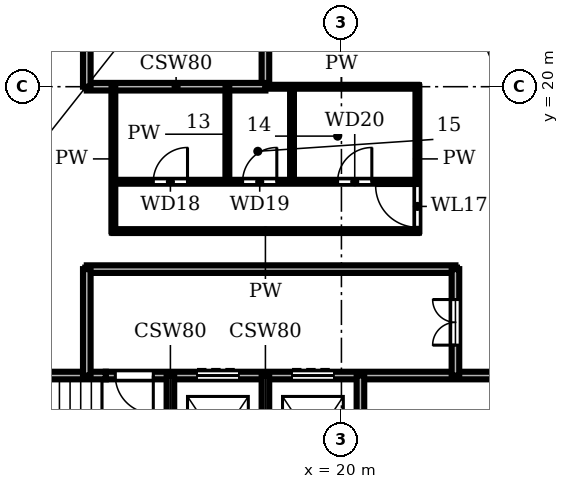
"""IFC4 building model, lengths in metres.
Left out: names, types, materials, properties, quantities, classifications, styles, units other than length and angle.
Written with IfcOpenShell. Run it as: python <this file> out.ifc"""

import sys

from ifc_helpers import new_model, si_unit, direction, frame, frame_2d, origin, place, context, subcontext, project, spatial, rectangle, extrude, element, fill, save


model = new_model("IFC4")
c1 = context("Model", 3, precision=1e-05, world=origin(), true_north=direction((0.0, 1.0)))
c2 = subcontext(c1, "Body", "Model", "MODEL_VIEW")
j1 = project(units=[si_unit("LENGTHUNIT", "METRE"), si_unit("PLANEANGLEUNIT", "RADIAN")], contexts=[c1])
p1 = place(None, origin())
s1 = spatial("IfcSite", under=j1, at=p1, CompositionType="ELEMENT")
p2 = place(p1, origin())
s2 = spatial("IfcBuilding", under=s1, at=p2, CompositionType="ELEMENT")
p3 = place(p2, frame((0.0, 0.0, 113.4)))
s3 = spatial("IfcBuildingStorey", under=s2, at=p3, CompositionType="ELEMENT", Elevation=113.4)
p4 = place(p3, frame((8.9, 12.4, 0.0), z_axis=(0.0, 0.0, 1.0), x_axis=(1.0, 0.0, 0.0)))
e1 = element("IfcWall", 1, at=p4, inside=s3, PredefinedType="SHEAR", context=c2, shape_type="SweptSolid", body=[
    extrude(rectangle(XDim=4.9, YDim=0.2, at=frame_2d((2.45, 0.0))), origin(), (0.0, 0.0, 1.0), 3.45),
])
p5 = place(p3, frame((13.8, 12.4, 0.0), z_axis=(0.0, 0.0, 1.0), x_axis=(1.0, 0.0, 0.0)))
e2 = element("IfcWall", 2, at=p5, inside=s3, PredefinedType="SHEAR", context=c2, shape_type="SweptSolid", body=[
    extrude(rectangle(XDim=13.3, YDim=0.2, at=frame_2d((6.65, 0.0))), origin(), (0.0, 0.0, 1.0), 3.45),
])
p6 = place(p5, frame((2.4, 0.0, 0.0)))
e3 = element("IfcOpeningElement", 3, at=p6, cuts=e2, PredefinedType="OPENING", context=c2, shape_type="SweptSolid", body=[
    extrude(rectangle(XDim=1.1, YDim=2.1, at=frame_2d((0.55, 1.05))), frame((0.0, 0.11, 0.0), z_axis=(0.0, -1.0, 0.0), x_axis=(1.0, 0.0, 0.0)), (0.0, 0.0, 1.0), 0.22),
])
p7 = place(p5, frame((4.9, 0.0, 0.0)))
e4 = element("IfcOpeningElement", 4, at=p7, cuts=e2, PredefinedType="OPENING", context=c2, shape_type="SweptSolid", body=[
    extrude(rectangle(XDim=1.1, YDim=2.1, at=frame_2d((0.55, 1.05))), frame((0.0, 0.11, 0.0), z_axis=(0.0, -1.0, 0.0), x_axis=(1.0, 0.0, 0.0)), (0.0, 0.0, 1.0), 0.22),
])
p8 = place(p5, frame((0.25, 0.0, 0.0)))
e5 = element("IfcOpeningElement", 5, at=p8, cuts=e2, PredefinedType="OPENING", context=c2, shape_type="SweptSolid", body=[
    extrude(rectangle(XDim=1.0, YDim=2.1, at=frame_2d((0.5, 1.05))), frame((0.0, 0.11, 0.0), z_axis=(0.0, -1.0, 0.0), x_axis=(1.0, 0.0, 0.0)), (0.0, 0.0, 1.0), 0.22),
])
p9 = place(p3, frame((13.3, 15.2, 0.0), z_axis=(0.0, 0.0, 1.0), x_axis=(1.0, 0.0, 0.0)))
e6 = element("IfcWall", 6, at=p9, inside=s3, PredefinedType="SHEAR", context=c2, shape_type="SweptSolid", body=[
    extrude(rectangle(XDim=9.7, YDim=0.2, at=frame_2d((4.85, 0.0))), origin(), (0.0, 0.0, 1.0), 3.45),
])
p10 = place(p3, frame((14.0, 16.2, 0.0), z_axis=(0.0, 0.0, 1.0), x_axis=(1.0, 0.0, 0.0)))
e7 = element("IfcWall", 7, at=p10, inside=s3, PredefinedType="PARTITIONING", context=c2, shape_type="SweptSolid", body=[
    extrude(rectangle(XDim=8.0, YDim=0.1, at=frame_2d((4.0, 0.0))), origin(), (0.0, 0.0, 1.0), 3.45),
])
p11 = place(p3, frame((14.0, 17.5, 0.0), z_axis=(0.0, 0.0, 1.0), x_axis=(1.0, 0.0, 0.0)))
e8 = element("IfcWall", 8, at=p11, inside=s3, PredefinedType="PARTITIONING", context=c2, shape_type="SweptSolid", body=[
    extrude(rectangle(XDim=8.0, YDim=0.1, at=frame_2d((4.0, 0.0))), origin(), (0.0, 0.0, 1.0), 3.45),
])
p12 = place(p11, frame((1.05, 0.0, 0.0)))
e9 = element("IfcOpeningElement", 9, at=p12, cuts=e8, PredefinedType="OPENING", context=c2, shape_type="SweptSolid", body=[
    extrude(rectangle(XDim=0.9, YDim=2.1, at=frame_2d((0.45, 1.05))), frame((0.0, 0.06, 0.0), z_axis=(0.0, -1.0, 0.0), x_axis=(1.0, 0.0, 0.0)), (0.0, 0.0, 1.0), 0.12),
])
p13 = place(p11, frame((3.4, 0.0, 0.0)))
e10 = element("IfcOpeningElement", 10, at=p13, cuts=e8, PredefinedType="OPENING", context=c2, shape_type="SweptSolid", body=[
    extrude(rectangle(XDim=0.9, YDim=2.1, at=frame_2d((0.45, 1.05))), frame((0.0, 0.06, 0.0), z_axis=(0.0, -1.0, 0.0), x_axis=(1.0, 0.0, 0.0)), (0.0, 0.0, 1.0), 0.12),
])
p14 = place(p11, frame((5.9, 0.0, 0.0)))
e11 = element("IfcOpeningElement", 11, at=p14, cuts=e8, PredefinedType="OPENING", context=c2, shape_type="SweptSolid", body=[
    extrude(rectangle(XDim=0.9, YDim=2.1, at=frame_2d((0.45, 1.05))), frame((0.0, 0.06, 0.0), z_axis=(0.0, -1.0, 0.0), x_axis=(1.0, 0.0, 0.0)), (0.0, 0.0, 1.0), 0.12),
])
p15 = place(p3, frame((18.0, 20.0, 0.0), z_axis=(0.0, 0.0, 1.0), x_axis=(1.0, 0.0, 0.0)))
e12 = element("IfcWall", 12, at=p15, inside=s3, PredefinedType="PARTITIONING", context=c2, shape_type="SweptSolid", body=[
    extrude(rectangle(XDim=4.0, YDim=0.1, at=frame_2d((2.0, 0.0))), origin(), (0.0, 0.0, 1.0), 3.45),
])
p16 = place(p3, frame((13.3, 20.0, 0.0), z_axis=(0.0, 0.0, 1.0), x_axis=(1.0, 0.0, 0.0)))
e13 = element("IfcWall", 13, at=p16, inside=s3, PredefinedType="SHEAR", context=c2, shape_type="SweptSolid", body=[
    extrude(rectangle(XDim=4.7, YDim=0.2, at=frame_2d((2.35, 0.0))), origin(), (0.0, 0.0, 1.0), 3.45),
])
p17 = place(p3, frame((13.3, 12.4, 0.0), z_axis=(0.0, 0.0, 1.0), x_axis=(0.0, 1.0, 0.0)))
e14 = element("IfcWall", 14, at=p17, inside=s3, PredefinedType="SHEAR", context=c2, shape_type="SweptSolid", body=[
    extrude(rectangle(XDim=2.8, YDim=0.2, at=frame_2d((1.4, 0.0))), origin(), (0.0, 0.0, 1.0), 3.45),
])
p18 = place(p3, frame((13.3, 20.0, 0.0), z_axis=(0.0, 0.0, 1.0), x_axis=(0.0, 1.0, 0.0)))
e15 = element("IfcWall", 15, at=p18, inside=s3, PredefinedType="SHEAR", context=c2, shape_type="SweptSolid", body=[
    extrude(rectangle(XDim=3.6, YDim=0.2, at=frame_2d((1.8, 0.0))), origin(), (0.0, 0.0, 1.0), 3.45),
])
p19 = place(p3, frame((14.0, 16.2, 0.0), z_axis=(0.0, 0.0, 1.0), x_axis=(0.0, 1.0, 0.0)))
e16 = element("IfcWall", 16, at=p19, inside=s3, PredefinedType="PARTITIONING", context=c2, shape_type="SweptSolid", body=[
    extrude(rectangle(XDim=3.8, YDim=0.1, at=frame_2d((1.9, 0.0))), origin(), (0.0, 0.0, 1.0), 3.45),
])
p20 = place(p3, frame((15.5, 8.9, 0.0), z_axis=(0.0, 0.0, 1.0), x_axis=(0.0, 1.0, 0.0)))
e17 = element("IfcWall", 17, at=p20, inside=s3, PredefinedType="SHEAR", context=c2, shape_type="SweptSolid", body=[
    extrude(rectangle(XDim=3.5, YDim=0.2, at=frame_2d((1.75, 0.0))), origin(), (0.0, 0.0, 1.0), 3.45),
])
p21 = place(p3, frame((17.0, 17.5, 0.0), z_axis=(0.0, 0.0, 1.0), x_axis=(0.0, 1.0, 0.0)))
e18 = element("IfcWall", 18, at=p21, inside=s3, PredefinedType="PARTITIONING", context=c2, shape_type="SweptSolid", body=[
    extrude(rectangle(XDim=2.5, YDim=0.1, at=frame_2d((1.25, 0.0))), origin(), (0.0, 0.0, 1.0), 3.45),
])
p22 = place(p3, frame((18.0, 8.9, 0.0), z_axis=(0.0, 0.0, 1.0), x_axis=(0.0, 1.0, 0.0)))
e19 = element("IfcWall", 19, at=p22, inside=s3, PredefinedType="SHEAR", context=c2, shape_type="SweptSolid", body=[
    extrude(rectangle(XDim=3.5, YDim=0.2, at=frame_2d((1.75, 0.0))), origin(), (0.0, 0.0, 1.0), 3.45),
])
p23 = place(p3, frame((18.0, 20.0, 0.0), z_axis=(0.0, 0.0, 1.0), x_axis=(0.0, 1.0, 0.0)))
e20 = element("IfcWall", 20, at=p23, inside=s3, PredefinedType="SHEAR", context=c2, shape_type="SweptSolid", body=[
    extrude(rectangle(XDim=7.1, YDim=0.2, at=frame_2d((3.55, 0.0))), origin(), (0.0, 0.0, 1.0), 3.45),
])
p24 = place(p23, frame((1.2, 0.0, 0.0)))
e21 = element("IfcOpeningElement", 21, at=p24, cuts=e20, PredefinedType="OPENING", context=c2, shape_type="SweptSolid", body=[
    extrude(rectangle(XDim=1.2, YDim=2.1, at=frame_2d((0.6, 1.05))), frame((0.0, 0.11, 0.0), z_axis=(0.0, -1.0, 0.0), x_axis=(1.0, 0.0, 0.0)), (0.0, 0.0, 1.0), 0.22),
])
p25 = place(p3, frame((18.7, 17.5, 0.0), z_axis=(0.0, 0.0, 1.0), x_axis=(0.0, 1.0, 0.0)))
e22 = element("IfcWall", 22, at=p25, inside=s3, PredefinedType="PARTITIONING", context=c2, shape_type="SweptSolid", body=[
    extrude(rectangle(XDim=2.5, YDim=0.1, at=frame_2d((1.25, 0.0))), origin(), (0.0, 0.0, 1.0), 3.45),
])
p26 = place(p3, frame((20.5, 8.9, 0.0), z_axis=(0.0, 0.0, 1.0), x_axis=(0.0, 1.0, 0.0)))
e23 = element("IfcWall", 23, at=p26, inside=s3, PredefinedType="SHEAR", context=c2, shape_type="SweptSolid", body=[
    extrude(rectangle(XDim=3.5, YDim=0.2, at=frame_2d((1.75, 0.0))), origin(), (0.0, 0.0, 1.0), 3.45),
])
p27 = place(p3, frame((22.0, 16.2, 0.0), z_axis=(0.0, 0.0, 1.0), x_axis=(0.0, 1.0, 0.0)))
e24 = element("IfcWall", 24, at=p27, inside=s3, PredefinedType="PARTITIONING", context=c2, shape_type="SweptSolid", body=[
    extrude(rectangle(XDim=3.8, YDim=0.1, at=frame_2d((1.9, 0.0))), origin(), (0.0, 0.0, 1.0), 3.45),
])
p28 = place(p27, frame((0.1, 0.0, 0.0)))
e25 = element("IfcOpeningElement", 25, at=p28, cuts=e24, PredefinedType="OPENING", context=c2, shape_type="SweptSolid", body=[
    extrude(rectangle(XDim=1.1, YDim=2.1, at=frame_2d((0.55, 1.05))), frame((0.0, 0.06, 0.0), z_axis=(0.0, -1.0, 0.0), x_axis=(1.0, 0.0, 0.0)), (0.0, 0.0, 1.0), 0.12),
])
p29 = place(p3, frame((23.0, 12.4, 0.0), z_axis=(0.0, 0.0, 1.0), x_axis=(0.0, 1.0, 0.0)))
e26 = element("IfcWall", 26, at=p29, inside=s3, PredefinedType="SHEAR", context=c2, shape_type="SweptSolid", body=[
    extrude(rectangle(XDim=2.8, YDim=0.2, at=frame_2d((1.4, 0.0))), origin(), (0.0, 0.0, 1.0), 3.45),
])
p30 = place(p29, frame((0.8, 0.0, 0.0)))
e27 = element("IfcOpeningElement", 27, at=p30, cuts=e26, PredefinedType="OPENING", context=c2, shape_type="SweptSolid", body=[
    extrude(rectangle(XDim=1.2, YDim=2.1, at=frame_2d((0.6, 1.05))), frame((0.0, 0.11, 0.0), z_axis=(0.0, -1.0, 0.0), x_axis=(1.0, 0.0, 0.0)), (0.0, 0.0, 1.0), 0.22),
])
p31 = place(p6, origin())
e28 = element("IfcDoor", 28, at=p31, inside=s3, OperationType="DOUBLE_DOOR_SLIDING", PredefinedType="DOOR", context=c2, shape_type="SweptSolid", body=[
    extrude(rectangle(XDim=1.1, YDim=2.1, at=frame_2d((0.55, 1.05))), frame((0.0, 0.025, 0.0), z_axis=(0.0, -1.0, 0.0), x_axis=(1.0, 0.0, 0.0)), (0.0, 0.0, 1.0), 0.05),
])
fill(e3, e28)
p32 = place(p7, origin())
e29 = element("IfcDoor", 29, at=p32, inside=s3, OperationType="DOUBLE_DOOR_SLIDING", PredefinedType="DOOR", context=c2, shape_type="SweptSolid", body=[
    extrude(rectangle(XDim=1.1, YDim=2.1, at=frame_2d((0.55, 1.05))), frame((0.0, 0.025, 0.0), z_axis=(0.0, -1.0, 0.0), x_axis=(1.0, 0.0, 0.0)), (0.0, 0.0, 1.0), 0.05),
])
fill(e4, e29)
p33 = place(p8, frame((1.0, 0.0, 0.0), z_axis=(0.0, 0.0, 1.0), x_axis=(-1.0, 0.0, 0.0)))
e30 = element("IfcDoor", 30, at=p33, inside=s3, OperationType="SINGLE_SWING_LEFT", PredefinedType="DOOR", context=c2, shape_type="SweptSolid", body=[
    extrude(rectangle(XDim=1.0, YDim=2.1, at=frame_2d((0.5, 1.05))), frame((0.0, 0.025, 0.0), z_axis=(0.0, -1.0, 0.0), x_axis=(1.0, 0.0, 0.0)), (0.0, 0.0, 1.0), 0.05),
])
fill(e5, e30)
p34 = place(p30, origin())
e31 = element("IfcDoor", 31, at=p34, inside=s3, OperationType="DOUBLE_DOOR_SINGLE_SWING", PredefinedType="DOOR", context=c2, shape_type="SweptSolid", body=[
    extrude(rectangle(XDim=1.2, YDim=2.1, at=frame_2d((0.6, 1.05))), frame((0.0, 0.025, 0.0), z_axis=(0.0, -1.0, 0.0), x_axis=(1.0, 0.0, 0.0)), (0.0, 0.0, 1.0), 0.05),
])
fill(e27, e31)
p35 = place(p28, origin())
e32 = element("IfcDoor", 32, at=p35, inside=s3, OperationType="SINGLE_SWING_RIGHT", PredefinedType="DOOR", context=c2, shape_type="SweptSolid", body=[
    extrude(rectangle(XDim=1.1, YDim=2.1, at=frame_2d((0.55, 1.05))), frame((0.0, 0.025, 0.0), z_axis=(0.0, -1.0, 0.0), x_axis=(1.0, 0.0, 0.0)), (0.0, 0.0, 1.0), 0.05),
])
fill(e25, e32)
p36 = place(p12, origin())
e33 = element("IfcDoor", 33, at=p36, inside=s3, OperationType="SINGLE_SWING_RIGHT", PredefinedType="DOOR", context=c2, shape_type="SweptSolid", body=[
    extrude(rectangle(XDim=0.9, YDim=2.1, at=frame_2d((0.45, 1.05))), frame((0.0, 0.025, 0.0), z_axis=(0.0, -1.0, 0.0), x_axis=(1.0, 0.0, 0.0)), (0.0, 0.0, 1.0), 0.05),
])
fill(e9, e33)
p37 = place(p13, origin())
e34 = element("IfcDoor", 34, at=p37, inside=s3, OperationType="SINGLE_SWING_RIGHT", PredefinedType="DOOR", context=c2, shape_type="SweptSolid", body=[
    extrude(rectangle(XDim=0.9, YDim=2.1, at=frame_2d((0.45, 1.05))), frame((0.0, 0.025, 0.0), z_axis=(0.0, -1.0, 0.0), x_axis=(1.0, 0.0, 0.0)), (0.0, 0.0, 1.0), 0.05),
])
fill(e10, e34)
p38 = place(p14, origin())
e35 = element("IfcDoor", 35, at=p38, inside=s3, OperationType="SINGLE_SWING_RIGHT", PredefinedType="DOOR", context=c2, shape_type="SweptSolid", body=[
    extrude(rectangle(XDim=0.9, YDim=2.1, at=frame_2d((0.45, 1.05))), frame((0.0, 0.025, 0.0), z_axis=(0.0, -1.0, 0.0), x_axis=(1.0, 0.0, 0.0)), (0.0, 0.0, 1.0), 0.05),
])
fill(e11, e35)
save(model, sys.argv[1])
